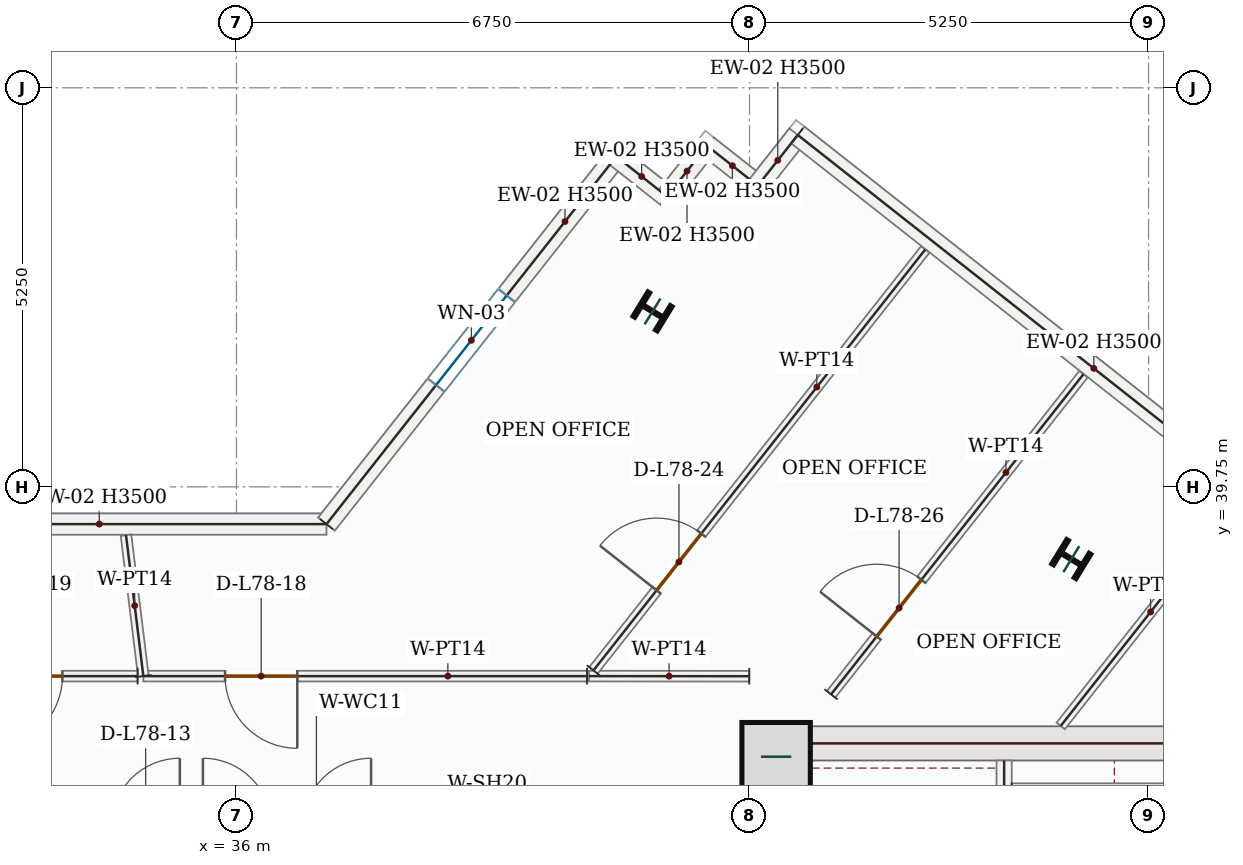
"""IFC4 building model, lengths in metres.
Left out: names, types, materials, properties, quantities, classifications, styles, units other than length and angle.
Written with IfcOpenShell. Run it as: python <this file> out.ifc"""

import sys

from ifc_helpers import new_model, si_unit, direction, frame, frame_2d, origin, origin_2d, place, context, subcontext, project, spatial, rectangle, i_section, extrude, source, transform, mapped, element, fill, save


model = new_model("IFC4")
c1 = context("Model", 3, precision=1e-05, world=origin(), true_north=direction((0.0, 1.0)))
c2 = subcontext(c1, "Body", "Model", "MODEL_VIEW")
j1 = project(units=[si_unit("LENGTHUNIT", "METRE"), si_unit("PLANEANGLEUNIT", "RADIAN")], contexts=[c1])
p1 = place(None, origin())
s1 = spatial("IfcSite", under=j1, at=p1, CompositionType="ELEMENT")
p2 = place(p1, origin())
s2 = spatial("IfcBuilding", under=s1, at=p2, CompositionType="ELEMENT")
p3 = place(p2, frame((0.0, 0.0, 323.55)))
s3 = spatial("IfcBuildingStorey", under=s2, at=p3, CompositionType="ELEMENT", Elevation=323.55)
p4 = place(p3, frame((42.975, 28.05, 0.0), z_axis=(0.0, 0.0, 1.0), x_axis=(0.0, 1.0, 0.0)))
e1 = element("IfcWall", 1, at=p4, inside=s3, PredefinedType="SHEAR", context=c2, shape_type="SweptSolid", body=[
    extrude(rectangle(XDim=8.55, YDim=0.45, at=frame_2d((4.275, 0.0))), origin(), (0.0, 0.0, 1.0), 3.5),
])
p5 = place(p4, frame((1.5, 0.0, 0.0)))
e2 = element("IfcOpeningElement", 2, at=p5, cuts=e1, PredefinedType="OPENING", context=c2, shape_type="SweptSolid", body=[
    extrude(rectangle(XDim=1.1, YDim=2.2, at=frame_2d((0.55, 1.1))), frame((0.0, 0.235, 0.0), z_axis=(0.0, -1.0, 0.0), x_axis=(1.0, 0.0, 0.0)), (0.0, 0.0, 1.0), 0.47),
])
m1 = source(origin(), c2, "Body", "SweptSolid", [
    extrude(rectangle(XDim=7.1, YDim=0.45, at=frame_2d((3.55, 0.0))), origin(), (0.0, 0.0, 1.0), 3.5),
])
p6 = place(p3, frame((43.2, 36.375, 0.0), z_axis=(0.0, 0.0, 1.0), x_axis=(1.0, 0.0, 0.0)))
e3 = element("IfcWall", 3, at=p6, inside=s3, PredefinedType="SHEAR", context=c2, shape_type="MappedRepresentation", body=[
    mapped(m1, transform((0.0, 0.0, 0.0), x_axis=(1.0, 0.0, 0.0), y_axis=(0.0, 1.0, 0.0), z_axis=(0.0, 0.0, 1.0), scale=1.0)),
])
m2 = source(origin(), c2, "Body", "SweptSolid", [
    extrude(rectangle(XDim=0.9, YDim=0.9, at=origin_2d()), origin(), (0.0, 0.0, 1.0), 3.75),
])
p7 = place(p3, frame((43.1, 36.2, 0.0), z_axis=(0.0, 0.0, 1.0), x_axis=(1.0, 0.0, 0.0)))
e4 = element("IfcColumn", 4, at=p7, inside=s3, PredefinedType="COLUMN", context=c2, shape_type="MappedRepresentation", body=[
    mapped(m2, transform((0.0, 0.0, 0.0), x_axis=(1.0, 0.0, 0.0), y_axis=(0.0, 1.0, 0.0), z_axis=(0.0, 0.0, 1.0), scale=1.0)),
])
m3 = source(origin(), c2, "Body", "SweptSolid", [
    extrude(i_section(OverallWidth=0.374, OverallDepth=0.372, WebThickness=0.016, FlangeThickness=0.026, FilletRadius=0.018, at=origin_2d()), origin(), (0.0, 0.0, 1.0), 3.75),
])
for number, where, z_axis, x_axis in (
    (5, (46.984, 38.8, 0.0), (0.0, 0.0, 1.0), (0.522, 0.853, 0.0)),
    (6, (41.475, 42.058, 0.0), (0.0, 0.0, 1.0), (0.522, 0.853, 0.0)),
):
    element("IfcColumn", number, at=place(p3, frame(where, z_axis=z_axis, x_axis=x_axis)), inside=s3, PredefinedType="COLUMN", context=c2, shape_type="MappedRepresentation", body=[
        mapped(m3, transform((0.0, 0.0, 0.0), x_axis=(1.0, 0.0, 0.0), y_axis=(0.0, 1.0, 0.0), z_axis=(0.0, 0.0, 1.0), scale=1.0)),
    ])
m4 = source(origin(), c2, "Body", "SweptSolid", [
    extrude(rectangle(XDim=5.978, YDim=0.28, at=frame_2d((2.989, 0.0))), origin(), (0.0, 0.0, 1.0), 3.5),
])
p8 = place(p3, frame((31.206, 39.26, 0.0), z_axis=(0.0, 0.0, 1.0), x_axis=(1.0, 0.0, 0.0)))
e7 = element("IfcWall", 7, at=p8, inside=s3, PredefinedType="SOLIDWALL", context=c2, shape_type="MappedRepresentation", body=[
    mapped(m4, transform((0.0, 0.0, 0.0), x_axis=(1.0, 0.0, 0.0), y_axis=(0.0, 1.0, 0.0), z_axis=(0.0, 0.0, 1.0), scale=1.0)),
])
p9 = place(p3, frame((37.184, 39.26, 0.0), z_axis=(0.0, 0.0, 1.0), x_axis=(0.619100474058, 0.78531178714, 0.0)))
e8 = element("IfcWall", 8, at=p9, inside=s3, PredefinedType="SOLIDWALL", context=c2, shape_type="SweptSolid", body=[
    extrude(rectangle(XDim=6.159, YDim=0.28, at=frame_2d((3.08, 0.0))), origin(), (0.0, 0.0, 1.0), 3.5),
])
p10 = place(p9, frame((2.329, 0.0, 0.85)))
e9 = element("IfcOpeningElement", 9, at=p10, cuts=e8, PredefinedType="OPENING", context=c2, shape_type="SweptSolid", body=[
    extrude(rectangle(XDim=1.5, YDim=1.5, at=frame_2d((0.75, 0.75))), frame((0.0, 0.15, 0.0), z_axis=(0.0, -1.0, 0.0), x_axis=(1.0, 0.0, 0.0)), (0.0, 0.0, 1.0), 0.3),
])
m5 = source(origin(), c2, "Body", "SweptSolid", [
    extrude(rectangle(XDim=0.85, YDim=0.28, at=frame_2d((0.425, 0.0))), origin(), (0.0, 0.0, 1.0), 3.5),
])
p11 = place(p3, frame((40.997, 44.097, 0.0), z_axis=(0.0, 0.0, 1.0), x_axis=(0.785220826193, -0.619215838066, 0.0)))
e10 = element("IfcWall", 10, at=p11, inside=s3, PredefinedType="SOLIDWALL", context=c2, shape_type="MappedRepresentation", body=[
    mapped(m5, transform((0.0, 0.0, 0.0), x_axis=(1.0, 0.0, 0.0), y_axis=(0.0, 1.0, 0.0), z_axis=(0.0, 0.0, 1.0), scale=1.0)),
])
m6 = source(origin(), c2, "Body", "SweptSolid", [
    extrude(rectangle(XDim=0.85, YDim=0.28, at=frame_2d((0.425, 0.0))), origin(), (0.0, 0.0, 1.0), 3.5),
])
for number, where, z_axis, x_axis in (
    (11, (41.665, 43.57, 0.0), (0.0, 0.0, 1.0), (0.619, 0.785, 0.0)),
    (12, (42.191, 44.238, 0.0), (0.0, 0.0, 1.0), (0.785, -0.619, 0.0)),
):
    element("IfcWall", number, at=place(p3, frame(where, z_axis=z_axis, x_axis=x_axis)), inside=s3, PredefinedType="SOLIDWALL", context=c2, shape_type="MappedRepresentation", body=[
        mapped(m6, transform((0.0, 0.0, 0.0), x_axis=(1.0, 0.0, 0.0), y_axis=(0.0, 1.0, 0.0), z_axis=(0.0, 0.0, 1.0), scale=1.0)),
    ])
p12 = place(p3, frame((42.858, 43.712, 0.0), z_axis=(0.0, 0.0, 1.0), x_axis=(0.619215838066, 0.785220826193, 0.0)))
e13 = element("IfcWall", 13, at=p12, inside=s3, PredefinedType="SOLIDWALL", context=c2, shape_type="MappedRepresentation", body=[
    mapped(m5, transform((0.0, 0.0, 0.0), x_axis=(1.0, 0.0, 0.0), y_axis=(0.0, 1.0, 0.0), z_axis=(0.0, 0.0, 1.0), scale=1.0)),
])
m7 = source(origin(), c2, "Body", "SweptSolid", [
    extrude(rectangle(XDim=9.92, YDim=0.28, at=frame_2d((4.96, 0.0))), origin(), (0.0, 0.0, 1.0), 3.5),
])
p13 = place(p3, frame((43.385, 44.379, 0.0), z_axis=(0.0, 0.0, 1.0), x_axis=(0.785317257435, -0.619093535077, 0.0)))
e14 = element("IfcWall", 14, at=p13, inside=s3, PredefinedType="SOLIDWALL", context=c2, shape_type="MappedRepresentation", body=[
    mapped(m7, transform((0.0, 0.0, 0.0), x_axis=(1.0, 0.0, 0.0), y_axis=(0.0, 1.0, 0.0), z_axis=(0.0, 0.0, 1.0), scale=1.0)),
])
p14 = place(p3, frame((46.1, 28.15, 0.0), z_axis=(0.0, 0.0, 1.0), x_axis=(0.0, 1.0, 0.0)))
e15 = element("IfcWall", 15, at=p14, inside=s3, PredefinedType="SOLIDWALL", context=c2, shape_type="SweptSolid", body=[
    extrude(rectangle(XDim=8.0, YDim=0.2, at=frame_2d((4.0, 0.0))), origin(), (0.0, 0.0, 1.0), 3.5),
])
p15 = place(p14, frame((0.4, 0.0, 0.0)))
e16 = element("IfcOpeningElement", 16, at=p15, cuts=e15, PredefinedType="OPENING", context=c2, shape_type="SweptSolid", body=[
    extrude(rectangle(XDim=1.05, YDim=2.15, at=frame_2d((0.525, 1.075))), frame((0.0, 0.11, 0.0), z_axis=(0.0, -1.0, 0.0), x_axis=(1.0, 0.0, 0.0)), (0.0, 0.0, 1.0), 0.22),
])
m8 = source(origin(), c2, "Body", "SweptSolid", [
    extrude(rectangle(XDim=3.25, YDim=0.2, at=frame_2d((1.625, 0.0))), origin(), (0.0, 0.0, 1.0), 3.5),
])
p16 = place(p3, frame((46.2, 35.75, 0.0), z_axis=(0.0, 0.0, 1.0), x_axis=(1.0, 0.0, 0.0)))
e17 = element("IfcWall", 17, at=p16, inside=s3, PredefinedType="SOLIDWALL", context=c2, shape_type="MappedRepresentation", body=[
    mapped(m8, transform((0.0, 0.0, 0.0), x_axis=(1.0, 0.0, 0.0), y_axis=(0.0, 1.0, 0.0), z_axis=(0.0, 0.0, 1.0), scale=1.0)),
])
m9 = source(origin(), c2, "Body", "SweptSolid", [
    extrude(rectangle(XDim=3.818, YDim=0.14, at=frame_2d((1.909, 0.0))), origin(), (0.0, 0.0, 1.0), 3.5),
])
p17 = place(p3, frame((49.208, 39.604, 0.0), z_axis=(0.0, 0.0, 1.0), x_axis=(-0.619119655452, -0.78529666511, 0.0)))
e18 = element("IfcWall", 18, at=p17, inside=s3, PredefinedType="PARTITIONING", context=c2, shape_type="MappedRepresentation", body=[
    mapped(m9, transform((0.0, 0.0, 0.0), x_axis=(1.0, 0.0, 0.0), y_axis=(0.0, 1.0, 0.0), z_axis=(0.0, 0.0, 1.0), scale=1.0)),
])
p18 = place(p3, frame((43.823, 37.02, 0.0), z_axis=(0.0, 0.0, 1.0), x_axis=(0.619105408422, 0.785307897109, 0.0)))
e19 = element("IfcWall", 19, at=p18, inside=s3, PredefinedType="PARTITIONING", context=c2, shape_type="SweptSolid", body=[
    extrude(rectangle(XDim=5.363, YDim=0.14, at=frame_2d((2.682, 0.0))), origin(), (0.0, 0.0, 1.0), 3.5),
])
p19 = place(p18, frame((0.971, 0.0, 0.0)))
e20 = element("IfcOpeningElement", 20, at=p19, cuts=e19, PredefinedType="OPENING", context=c2, shape_type="SweptSolid", body=[
    extrude(rectangle(XDim=0.95, YDim=2.15, at=frame_2d((0.475, 1.075))), frame((0.0, 0.08, 0.0), z_axis=(0.0, -1.0, 0.0), x_axis=(1.0, 0.0, 0.0)), (0.0, 0.0, 1.0), 0.16),
])
m10 = source(origin(), c2, "Body", "SweptSolid", [
    extrude(rectangle(XDim=2.109, YDim=0.14, at=frame_2d((1.054, 0.0))), origin(), (0.0, 0.0, 1.0), 3.5),
])
p20 = place(p3, frame((42.747, 37.259, 0.0), z_axis=(0.0, 0.0, 1.0), x_axis=(-0.999999832474, 0.000578837597, 0.0)))
e21 = element("IfcWall", 21, at=p20, inside=s3, PredefinedType="PARTITIONING", context=c2, shape_type="MappedRepresentation", body=[
    mapped(m10, transform((0.0, 0.0, 0.0), x_axis=(1.0, 0.0, 0.0), y_axis=(0.0, 1.0, 0.0), z_axis=(0.0, 0.0, 1.0), scale=1.0)),
])
p21 = place(p3, frame((40.697, 37.335, 0.0), z_axis=(0.0, 0.0, 1.0), x_axis=(0.619105259882, 0.785308014213, 0.0)))
e22 = element("IfcWall", 22, at=p21, inside=s3, PredefinedType="PARTITIONING", context=c2, shape_type="SweptSolid", body=[
    extrude(rectangle(XDim=7.051, YDim=0.14, at=frame_2d((3.525, 0.0))), origin(), (0.0, 0.0, 1.0), 3.5),
])
p22 = place(p21, frame((1.342, 0.0, 0.0)))
e23 = element("IfcOpeningElement", 23, at=p22, cuts=e22, PredefinedType="OPENING", context=c2, shape_type="SweptSolid", body=[
    extrude(rectangle(XDim=0.95, YDim=2.15, at=frame_2d((0.475, 1.075))), frame((0.0, 0.08, 0.0), z_axis=(0.0, -1.0, 0.0), x_axis=(1.0, 0.0, 0.0)), (0.0, 0.0, 1.0), 0.16),
])
p23 = place(p3, frame((40.612, 37.26, 0.0), z_axis=(0.0, 0.0, 1.0), x_axis=(-1.0, 0.0, 0.0)))
e24 = element("IfcWall", 24, at=p23, inside=s3, PredefinedType="PARTITIONING", context=c2, shape_type="SweptSolid", body=[
    extrude(rectangle(XDim=5.837, YDim=0.14, at=frame_2d((2.918, 0.0))), origin(), (0.0, 0.0, 1.0), 3.5),
])
p24 = place(p23, frame((3.812, 0.0, 0.0)))
e25 = element("IfcOpeningElement", 25, at=p24, cuts=e24, PredefinedType="OPENING", context=c2, shape_type="SweptSolid", body=[
    extrude(rectangle(XDim=0.95, YDim=2.15, at=frame_2d((0.475, 1.075))), frame((0.0, 0.08, 0.0), z_axis=(0.0, -1.0, 0.0), x_axis=(1.0, 0.0, 0.0)), (0.0, 0.0, 1.0), 0.16),
])
m11 = source(origin(), c2, "Body", "SweptSolid", [
    extrude(rectangle(XDim=1.869, YDim=0.14, at=frame_2d((0.934, 0.0))), origin(), (0.0, 0.0, 1.0), 3.5),
])
p25 = place(p3, frame((34.775, 37.26, 0.0), z_axis=(0.0, 0.0, 1.0), x_axis=(-0.122153221409, 0.992511254596, 0.0)))
e26 = element("IfcWall", 26, at=p25, inside=s3, PredefinedType="PARTITIONING", context=c2, shape_type="MappedRepresentation", body=[
    mapped(m11, transform((0.0, 0.0, 0.0), x_axis=(1.0, 0.0, 0.0), y_axis=(0.0, 1.0, 0.0), z_axis=(0.0, 0.0, 1.0), scale=1.0)),
])
p26 = place(p3, frame((34.7, 37.26, 0.0), z_axis=(0.0, 0.0, 1.0), x_axis=(-0.999999995981, -8.9657955e-05, 0.0)))
e27 = element("IfcWall", 27, at=p26, inside=s3, PredefinedType="PARTITIONING", context=c2, shape_type="SweptSolid", body=[
    extrude(rectangle(XDim=5.446, YDim=0.14, at=frame_2d((2.723, 0.0))), origin(), (0.0, 0.0, 1.0), 3.5),
])
p27 = place(p26, frame((0.989, 0.0, 0.0)))
e28 = element("IfcOpeningElement", 28, at=p27, cuts=e27, PredefinedType="OPENING", context=c2, shape_type="SweptSolid", body=[
    extrude(rectangle(XDim=0.95, YDim=2.15, at=frame_2d((0.475, 1.075))), frame((0.0, 0.08, 0.0), z_axis=(0.0, -1.0, 0.0), x_axis=(1.0, 0.0, 0.0)), (0.0, 0.0, 1.0), 0.16),
])
m12 = source(origin(), c2, "Body", "SweptSolid", [
    extrude(rectangle(XDim=1.5, YDim=1.5, at=frame_2d((0.75, 0.75))), frame((0.0, 0.03, 0.0), z_axis=(0.0, -1.0, 0.0), x_axis=(1.0, 0.0, 0.0)), (0.0, 0.0, 1.0), 0.06),
])
p28 = place(p10, origin())
e29 = element("IfcWindow", 29, at=p28, inside=s3, PartitioningType="SINGLE_PANEL", PredefinedType="WINDOW", context=c2, shape_type="MappedRepresentation", body=[
    mapped(m12, transform((0.0, 0.0, 0.0), x_axis=(1.0, 0.0, 0.0), y_axis=(0.0, 1.0, 0.0), z_axis=(0.0, 0.0, 1.0), scale=1.0)),
])
fill(e9, e29)
m13 = source(origin(), c2, "Body", "SweptSolid", [
    extrude(rectangle(XDim=0.95, YDim=2.15, at=frame_2d((0.475, 1.075))), frame((0.0, 0.025, 0.0), z_axis=(0.0, -1.0, 0.0), x_axis=(1.0, 0.0, 0.0)), (0.0, 0.0, 1.0), 0.05),
])
p29 = place(p24, origin())
e30 = element("IfcDoor", 30, at=p29, inside=s3, OperationType="SINGLE_SWING_LEFT", PredefinedType="DOOR", context=c2, shape_type="MappedRepresentation", body=[
    mapped(m13, transform((0.0, 0.0, 0.0), x_axis=(1.0, 0.0, 0.0), y_axis=(0.0, 1.0, 0.0), z_axis=(0.0, 0.0, 1.0), scale=1.0)),
])
fill(e25, e30)
p30 = place(p27, origin())
e31 = element("IfcDoor", 31, at=p30, inside=s3, OperationType="SINGLE_SWING_RIGHT", PredefinedType="DOOR", context=c2, shape_type="MappedRepresentation", body=[
    mapped(m13, transform((0.0, 0.0, 0.0), x_axis=(1.0, 0.0, 0.0), y_axis=(0.0, 1.0, 0.0), z_axis=(0.0, 0.0, 1.0), scale=1.0)),
])
fill(e28, e31)
p31 = place(p22, origin())
e32 = element("IfcDoor", 32, at=p31, inside=s3, OperationType="SINGLE_SWING_LEFT", PredefinedType="DOOR", context=c2, shape_type="MappedRepresentation", body=[
    mapped(m13, transform((0.0, 0.0, 0.0), x_axis=(1.0, 0.0, 0.0), y_axis=(0.0, 1.0, 0.0), z_axis=(0.0, 0.0, 1.0), scale=1.0)),
])
fill(e23, e32)
p32 = place(p19, origin())
e33 = element("IfcDoor", 33, at=p32, inside=s3, OperationType="SINGLE_SWING_LEFT", PredefinedType="DOOR", context=c2, shape_type="MappedRepresentation", body=[
    mapped(m13, transform((0.0, 0.0, 0.0), x_axis=(1.0, 0.0, 0.0), y_axis=(0.0, 1.0, 0.0), z_axis=(0.0, 0.0, 1.0), scale=1.0)),
])
fill(e20, e33)
save(model, sys.argv[1])
